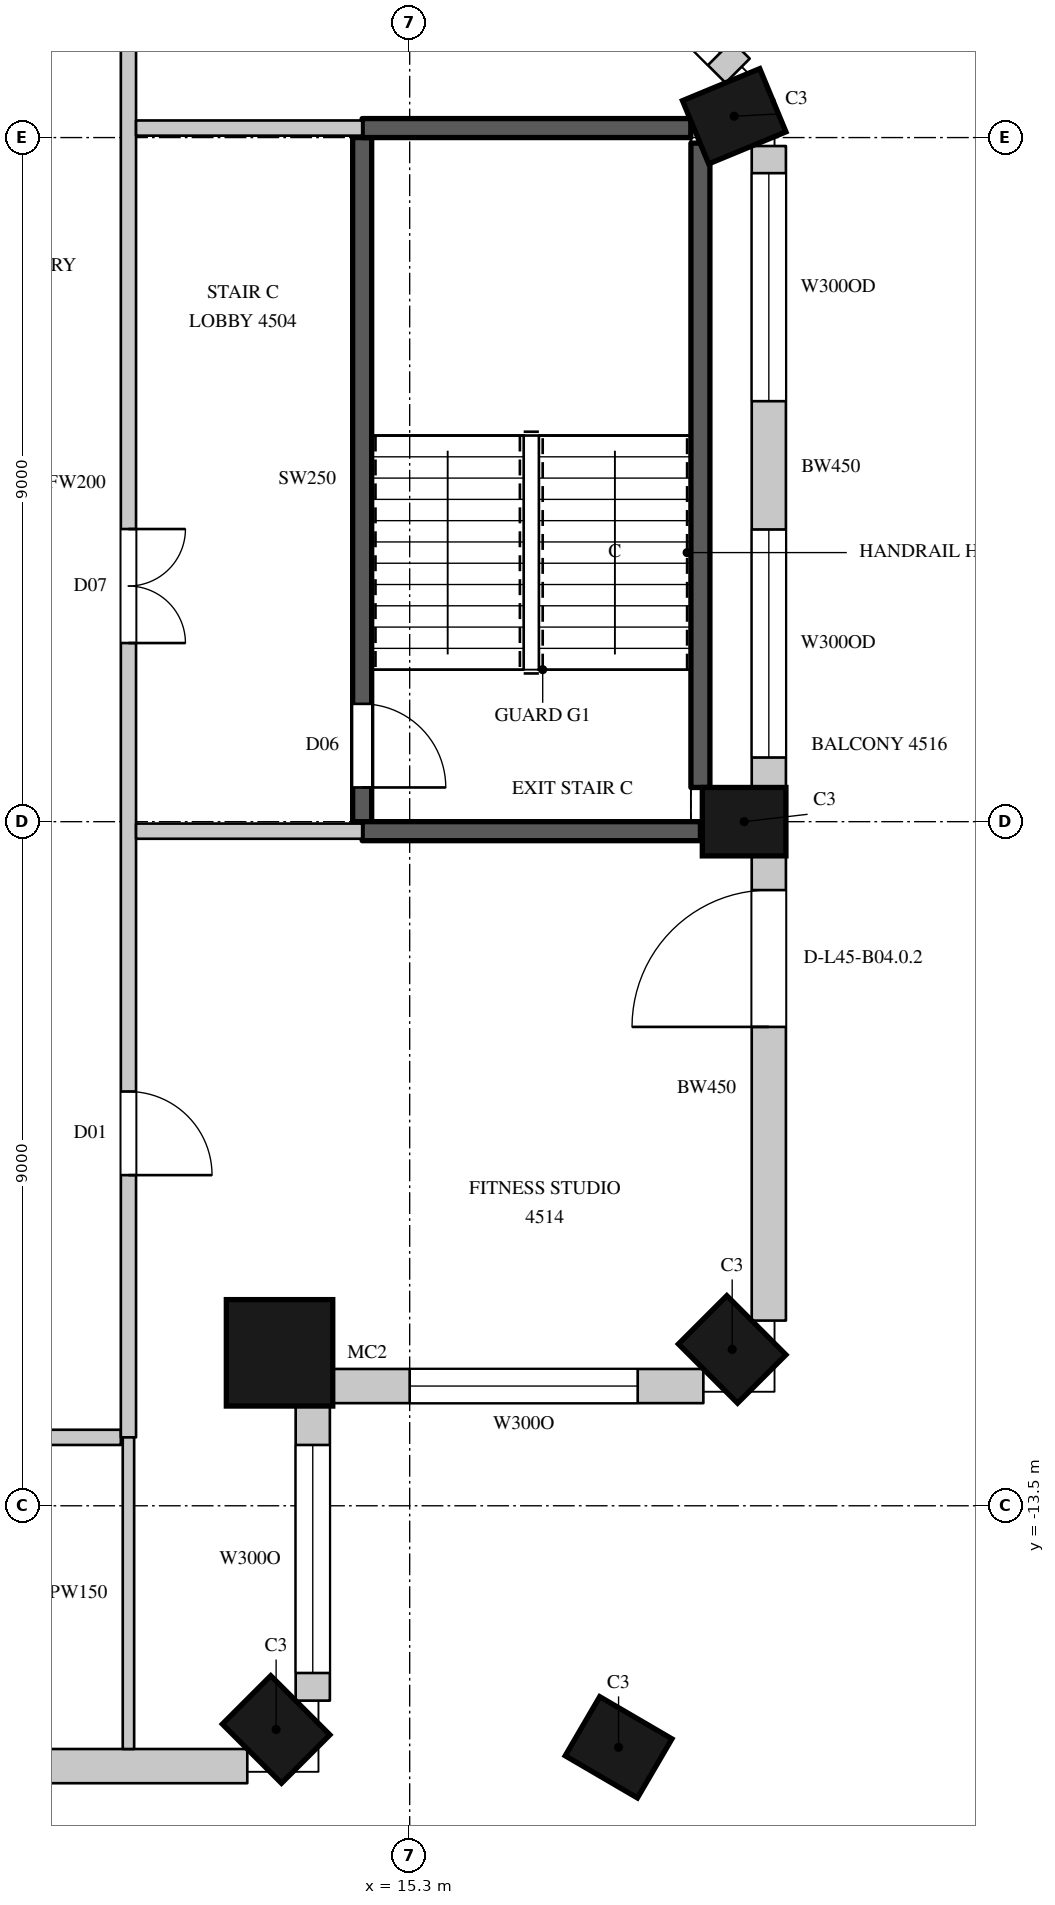
"""IFC4 building model, lengths in metres.
Left out: names, types, materials, properties, quantities, classifications, styles, units other than length and angle.
Written with IfcOpenShell. Run it as: python <this file> out.ifc"""

import sys

from ifc_helpers import new_model, si_unit, direction, frame, frame_2d, origin, origin_2d, place, context, subcontext, project, spatial, rectangle, circle, extrude, element, fill, save


model = new_model("IFC4")
c1 = context("Model", 3, precision=1e-05, world=origin(), true_north=direction((0.0, 1.0)))
c2 = subcontext(c1, "Body", "Model", "MODEL_VIEW")
j1 = project(units=[si_unit("LENGTHUNIT", "METRE"), si_unit("PLANEANGLEUNIT", "RADIAN")], contexts=[c1])
p1 = place(None, origin())
s1 = spatial("IfcSite", under=j1, at=p1, CompositionType="ELEMENT")
p2 = place(p1, origin())
s2 = spatial("IfcBuilding", under=s1, at=p2, CompositionType="ELEMENT")
p3 = place(p2, frame((0.0, 0.0, 205.6)))
s3 = spatial("IfcBuildingStorey", under=s2, at=p3, CompositionType="ELEMENT", Elevation=205.6)
p4 = place(p3, frame((13.543, -16.443, 0.0), z_axis=(0.0, 0.0, 1.0), x_axis=(0.707106781187, 0.707106781187, 0.0)))
e1 = element("IfcColumn", 1, at=p4, inside=s3, PredefinedType="COLUMN", context=c2, shape_type="SweptSolid", body=[
    extrude(rectangle(XDim=0.9, YDim=1.1, at=origin_2d()), origin(), (0.0, 0.0, 1.0), 4.1),
])
p5 = place(p3, frame((13.588, -11.488, 0.0), z_axis=(0.0, 0.0, 1.0), x_axis=(1.0, 0.0, 0.0)))
e2 = element("IfcColumn", 2, at=p5, inside=s3, PredefinedType="COLUMN", context=c2, shape_type="SweptSolid", body=[
    extrude(circle(Radius=0.7, at=origin_2d()), origin(), (0.0, 0.0, 1.0), 4.1),
])
for number, where, z_axis, x_axis in (
    (3, (19.543, -11.443, 0.0), (0.0, 0.0, 1.0), (0.707, 0.707, 0.0)),
    (4, (19.7, -4.5, 0.0), (0.0, 0.0, 1.0), (0.0, 1.0, 0.0)),
    (5, (19.57, 4.78, 0.0), (0.0, 0.0, 1.0), (-0.383, 0.924, 0.0)),
    (6, (18.048, -16.677, 0.0), (0.0, 0.0, 1.0), (0.504, 0.863, 0.0)),
):
    element("IfcColumn", number, at=place(p3, frame(where, z_axis=z_axis, x_axis=x_axis)), inside=s3, PredefinedType="COLUMN", context=c2, shape_type="SweptSolid", body=[
        extrude(rectangle(XDim=0.9, YDim=1.1, at=origin_2d()), origin(), (0.0, 0.0, 1.0), 4.1),
    ])
p6 = place(p3, frame((6.75, -16.925, 0.0), z_axis=(0.0, 0.0, 1.0), x_axis=(1.0, 0.0, 0.0)))
e7 = element("IfcWall", 7, at=p6, inside=s3, PredefinedType="SOLIDWALL", context=c2, shape_type="SweptSolid", body=[
    extrude(rectangle(XDim=6.414, YDim=0.45, at=frame_2d((3.207, 0.0))), origin(), (0.0, 0.0, 1.0), 3.8),
])
p7 = place(p6, frame((0.525, 0.0, 0.0)))
e8 = element("IfcOpeningElement", 8, at=p7, cuts=e7, PredefinedType="OPENING", context=c2, shape_type="SweptSolid", body=[
    extrude(rectangle(XDim=1.8, YDim=2.4, at=frame_2d((0.9, 1.2))), frame((0.0, 0.235, 0.0), z_axis=(0.0, -1.0, 0.0), x_axis=(1.0, 0.0, 0.0)), (0.0, 0.0, 1.0), 0.47),
])
p8 = place(p3, frame((14.025, -16.064, 0.0), z_axis=(0.0, 0.0, 1.0), x_axis=(0.0, 1.0, 0.0)))
e9 = element("IfcWall", 9, at=p8, inside=s3, PredefinedType="SOLIDWALL", context=c2, shape_type="SweptSolid", body=[
    extrude(rectangle(XDim=3.909, YDim=0.45, at=frame_2d((1.955, 0.0))), origin(), (0.0, 0.0, 1.0), 3.8),
])
p9 = place(p8, frame((0.364, 0.0, 1.05)))
e10 = element("IfcOpeningElement", 10, at=p9, cuts=e9, PredefinedType="OPENING", context=c2, shape_type="SweptSolid", body=[
    extrude(rectangle(XDim=3.0, YDim=2.4, at=frame_2d((1.5, 1.2))), frame((0.0, 0.235, 0.0), z_axis=(0.0, -1.0, 0.0), x_axis=(1.0, 0.0, 0.0)), (0.0, 0.0, 1.0), 0.47),
])
p10 = place(p3, frame((14.255, -11.925, 0.0), z_axis=(0.0, 0.0, 1.0), x_axis=(1.0, 0.0, 0.0)))
e11 = element("IfcWall", 11, at=p10, inside=s3, PredefinedType="SOLIDWALL", context=c2, shape_type="SweptSolid", body=[
    extrude(rectangle(XDim=4.909, YDim=0.45, at=frame_2d((2.455, 0.0))), origin(), (0.0, 0.0, 1.0), 3.8),
])
p11 = place(p10, frame((1.045, 0.0, 1.05)))
e12 = element("IfcOpeningElement", 12, at=p11, cuts=e11, PredefinedType="OPENING", context=c2, shape_type="SweptSolid", body=[
    extrude(rectangle(XDim=3.0, YDim=2.4, at=frame_2d((1.5, 1.2))), frame((0.0, 0.235, 0.0), z_axis=(0.0, -1.0, 0.0), x_axis=(1.0, 0.0, 0.0)), (0.0, 0.0, 1.0), 0.47),
])
p12 = place(p3, frame((20.025, -11.064, 0.0), z_axis=(0.0, 0.0, 1.0), x_axis=(0.0, 1.0, 0.0)))
e13 = element("IfcWall", 13, at=p12, inside=s3, PredefinedType="SOLIDWALL", context=c2, shape_type="SweptSolid", body=[
    extrude(rectangle(XDim=6.114, YDim=0.45, at=frame_2d((3.057, 0.0))), origin(), (0.0, 0.0, 1.0), 3.8),
])
p13 = place(p12, frame((3.864, 0.0, 0.0)))
e14 = element("IfcOpeningElement", 14, at=p13, cuts=e13, PredefinedType="OPENING", context=c2, shape_type="SweptSolid", body=[
    extrude(rectangle(XDim=1.8, YDim=2.4, at=frame_2d((0.9, 1.2))), frame((0.0, 0.235, 0.0), z_axis=(0.0, -1.0, 0.0), x_axis=(1.0, 0.0, 0.0)), (0.0, 0.0, 1.0), 0.47),
])
p14 = place(p3, frame((20.025, -4.05, 0.0), z_axis=(0.0, 0.0, 1.0), x_axis=(0.0, 1.0, 0.0)))
e15 = element("IfcWall", 15, at=p14, inside=s3, PredefinedType="SOLIDWALL", context=c2, shape_type="SweptSolid", body=[
    extrude(rectangle(XDim=8.439, YDim=0.45, at=frame_2d((4.219, 0.0))), origin(), (0.0, 0.0, 1.0), 3.8),
])
p15 = place(p14, frame((0.394, 0.0, 1.05)))
e16 = element("IfcOpeningElement", 16, at=p15, cuts=e15, PredefinedType="OPENING", context=c2, shape_type="SweptSolid", body=[
    extrude(rectangle(XDim=3.0, YDim=2.4, at=frame_2d((1.5, 1.2))), frame((0.0, 0.235, 0.0), z_axis=(0.0, -1.0, 0.0), x_axis=(1.0, 0.0, 0.0)), (0.0, 0.0, 1.0), 0.47),
])
p16 = place(p14, frame((5.082, 0.0, 1.05)))
e17 = element("IfcOpeningElement", 17, at=p16, cuts=e15, PredefinedType="OPENING", context=c2, shape_type="SweptSolid", body=[
    extrude(rectangle(XDim=3.0, YDim=2.4, at=frame_2d((1.5, 1.2))), frame((0.0, 0.235, 0.0), z_axis=(0.0, -1.0, 0.0), x_axis=(1.0, 0.0, 0.0)), (0.0, 0.0, 1.0), 0.47),
])
p17 = place(p3, frame((19.615, 5.379, 0.0), z_axis=(0.0, 0.0, 1.0), x_axis=(-0.707089646058, 0.7071239159, 0.0)))
e18 = element("IfcWall", 18, at=p17, inside=s3, PredefinedType="SOLIDWALL", context=c2, shape_type="SweptSolid", body=[
    extrude(rectangle(XDim=7.124, YDim=0.45, at=frame_2d((3.562, 0.0))), origin(), (0.0, 0.0, 1.0), 3.8),
])
p18 = place(p17, frame((0.328, 0.0, 1.05)))
e19 = element("IfcOpeningElement", 19, at=p18, cuts=e18, PredefinedType="OPENING", context=c2, shape_type="SweptSolid", body=[
    extrude(rectangle(XDim=2.4, YDim=2.4, at=frame_2d((1.2, 1.2))), frame((0.0, 0.235, 0.0), z_axis=(0.0, -1.0, 0.0), x_axis=(1.0, 0.0, 0.0)), (0.0, 0.0, 1.0), 0.47),
])
p19 = place(p17, frame((4.359, 0.0, 1.05)))
e20 = element("IfcOpeningElement", 20, at=p19, cuts=e18, PredefinedType="OPENING", context=c2, shape_type="SweptSolid", body=[
    extrude(rectangle(XDim=2.4, YDim=2.4, at=frame_2d((1.2, 1.2))), frame((0.0, 0.235, 0.0), z_axis=(0.0, -1.0, 0.0), x_axis=(1.0, 0.0, 0.0)), (0.0, 0.0, 1.0), 0.47),
])
p20 = place(p3, frame((6.28, -12.6, 0.0), z_axis=(0.0, 0.0, 1.0), x_axis=(1.0, 0.0, 0.0)))
e21 = element("IfcWall", 21, at=p20, inside=s3, PredefinedType="PARTITIONING", context=c2, shape_type="SweptSolid", body=[
    extrude(rectangle(XDim=5.22, YDim=0.2, at=frame_2d((2.61, 0.0))), origin(), (0.0, 0.0, 1.0), 3.8),
])
p21 = place(p20, frame((0.8, 0.0, 0.0)))
e22 = element("IfcOpeningElement", 22, at=p21, cuts=e21, PredefinedType="OPENING", context=c2, shape_type="SweptSolid", body=[
    extrude(rectangle(XDim=1.1, YDim=2.4, at=frame_2d((0.55, 1.2))), frame((0.0, 0.11, 0.0), z_axis=(0.0, -1.0, 0.0), x_axis=(1.0, 0.0, 0.0)), (0.0, 0.0, 1.0), 0.22),
])
p22 = place(p3, frame((11.6, -12.6, 0.0), z_axis=(0.0, 0.0, 1.0), x_axis=(0.0, 1.0, 0.0)))
e23 = element("IfcWall", 23, at=p22, inside=s3, PredefinedType="PARTITIONING", context=c2, shape_type="SweptSolid", body=[
    extrude(rectangle(XDim=25.1, YDim=0.2, at=frame_2d((12.55, 0.0))), origin(), (0.0, 0.0, 1.0), 3.8),
])
p23 = place(p22, frame((10.45, 0.0, 0.0)))
e24 = element("IfcOpeningElement", 24, at=p23, cuts=e23, PredefinedType="OPENING", context=c2, shape_type="SweptSolid", body=[
    extrude(rectangle(XDim=1.5, YDim=2.4, at=frame_2d((0.75, 1.2))), frame((0.0, 0.11, 0.0), z_axis=(0.0, -1.0, 0.0), x_axis=(1.0, 0.0, 0.0)), (0.0, 0.0, 1.0), 0.22),
])
p24 = place(p22, frame((3.45, 0.0, 0.0)))
e25 = element("IfcOpeningElement", 25, at=p24, cuts=e23, PredefinedType="OPENING", context=c2, shape_type="SweptSolid", body=[
    extrude(rectangle(XDim=1.1, YDim=2.4, at=frame_2d((0.55, 1.2))), frame((0.0, 0.11, 0.0), z_axis=(0.0, -1.0, 0.0), x_axis=(1.0, 0.0, 0.0)), (0.0, 0.0, 1.0), 0.22),
])
for number, where, z_axis, x_axis in (
    (26, (11.7, -4.625, 0.0), (0.0, 0.0, 1.0), (1.0, 0.0, 0.0)),
    (27, (11.7, 4.625, 0.0), (0.0, 0.0, 1.0), (1.0, 0.0, 0.0)),
):
    element("IfcWall", number, at=place(p3, frame(where, z_axis=z_axis, x_axis=x_axis)), inside=s3, PredefinedType="PARTITIONING", context=c2, shape_type="SweptSolid", body=[
        extrude(rectangle(XDim=2.975, YDim=0.2, at=frame_2d((1.488, 0.0))), origin(), (0.0, 0.0, 1.0), 3.8),
    ])
p25 = place(p3, frame((11.6, -16.7, 0.0), z_axis=(0.0, 0.0, 1.0), x_axis=(0.0, 1.0, 0.0)))
e28 = element("IfcWall", 28, at=p25, inside=s3, PredefinedType="PARTITIONING", context=c2, shape_type="SweptSolid", body=[
    extrude(rectangle(XDim=4.1, YDim=0.15, at=frame_2d((2.05, 0.0))), origin(), (0.0, 0.0, 1.0), 3.8),
])
p26 = place(p3, frame((14.675, -4.5, 0.0), z_axis=(0.0, 0.0, 1.0), x_axis=(0.0, 1.0, 0.0)))
e29 = element("IfcWall", 29, at=p26, inside=s3, PredefinedType="SHEAR", context=c2, shape_type="SweptSolid", body=[
    extrude(rectangle(XDim=9.0, YDim=0.25, at=frame_2d((4.5, 0.0))), origin(), (0.0, 0.0, 1.0), 3.8),
])
p27 = place(p26, frame((0.45, 0.0, 0.0)))
e30 = element("IfcOpeningElement", 30, at=p27, cuts=e29, PredefinedType="OPENING", context=c2, shape_type="SweptSolid", body=[
    extrude(rectangle(XDim=1.1, YDim=2.2, at=frame_2d((0.55, 1.1))), frame((0.0, 0.135, 0.0), z_axis=(0.0, -1.0, 0.0), x_axis=(1.0, 0.0, 0.0)), (0.0, 0.0, 1.0), 0.27),
])
p28 = place(p3, frame((14.675, -4.625, 0.0), z_axis=(0.0, 0.0, 1.0), x_axis=(1.0, 0.0, 0.0)))
e31 = element("IfcWall", 31, at=p28, inside=s3, PredefinedType="SHEAR", context=c2, shape_type="SweptSolid", body=[
    extrude(rectangle(XDim=4.45, YDim=0.25, at=frame_2d((2.225, 0.0))), origin(), (0.0, 0.0, 1.0), 3.8),
])
p29 = place(p3, frame((14.675, 4.625, 0.0), z_axis=(0.0, 0.0, 1.0), x_axis=(1.0, 0.0, 0.0)))
e32 = element("IfcWall", 32, at=p29, inside=s3, PredefinedType="SHEAR", context=c2, shape_type="SweptSolid", body=[
    extrude(rectangle(XDim=4.324, YDim=0.25, at=frame_2d((2.162, 0.0))), origin(), (0.0, 0.0, 1.0), 3.8),
])
p30 = place(p3, frame((19.125, -4.05, 0.0), z_axis=(0.0, 0.0, 1.0), x_axis=(0.0, 1.0, 0.0)))
e33 = element("IfcWall", 33, at=p30, inside=s3, PredefinedType="SHEAR", context=c2, shape_type="SweptSolid", body=[
    extrude(rectangle(XDim=8.477, YDim=0.25, at=frame_2d((4.238, 0.0))), origin(), (0.0, 0.0, 1.0), 3.8),
])
p31 = place(p9, origin())
e34 = element("IfcWindow", 34, at=p31, inside=s3, PartitioningType="SINGLE_PANEL", PredefinedType="WINDOW", context=c2, shape_type="SweptSolid", body=[
    extrude(rectangle(XDim=3.0, YDim=2.4, at=frame_2d((1.5, 1.2))), frame((0.0, 0.135, 0.0), z_axis=(0.0, -1.0, 0.0), x_axis=(1.0, 0.0, 0.0)), (0.0, 0.0, 1.0), 0.06),
])
fill(e10, e34)
p32 = place(p11, origin())
e35 = element("IfcWindow", 35, at=p32, inside=s3, PartitioningType="SINGLE_PANEL", PredefinedType="WINDOW", context=c2, shape_type="SweptSolid", body=[
    extrude(rectangle(XDim=3.0, YDim=2.4, at=frame_2d((1.5, 1.2))), frame((0.0, 0.135, 0.0), z_axis=(0.0, -1.0, 0.0), x_axis=(1.0, 0.0, 0.0)), (0.0, 0.0, 1.0), 0.06),
])
fill(e12, e35)
p33 = place(p13, origin())
e36 = element("IfcDoor", 36, at=p33, inside=s3, OperationType="SLIDING_TO_LEFT", PredefinedType="DOOR", context=c2, shape_type="SweptSolid", body=[
    extrude(rectangle(XDim=1.8, YDim=2.4, at=frame_2d((0.9, 1.2))), frame((0.0, 0.13, 0.0), z_axis=(0.0, -1.0, 0.0), x_axis=(1.0, 0.0, 0.0)), (0.0, 0.0, 1.0), 0.05),
])
fill(e14, e36)
p34 = place(p15, origin())
e37 = element("IfcWindow", 37, at=p34, inside=s3, PartitioningType="SINGLE_PANEL", PredefinedType="WINDOW", context=c2, shape_type="SweptSolid", body=[
    extrude(rectangle(XDim=3.0, YDim=2.4, at=frame_2d((1.5, 1.2))), frame((0.0, 0.135, 0.0), z_axis=(0.0, -1.0, 0.0), x_axis=(1.0, 0.0, 0.0)), (0.0, 0.0, 1.0), 0.06),
])
fill(e16, e37)
p35 = place(p16, origin())
e38 = element("IfcWindow", 38, at=p35, inside=s3, PartitioningType="SINGLE_PANEL", PredefinedType="WINDOW", context=c2, shape_type="SweptSolid", body=[
    extrude(rectangle(XDim=3.0, YDim=2.4, at=frame_2d((1.5, 1.2))), frame((0.0, 0.135, 0.0), z_axis=(0.0, -1.0, 0.0), x_axis=(1.0, 0.0, 0.0)), (0.0, 0.0, 1.0), 0.06),
])
fill(e17, e38)
p36 = place(p18, origin())
e39 = element("IfcWindow", 39, at=p36, inside=s3, PartitioningType="SINGLE_PANEL", PredefinedType="WINDOW", context=c2, shape_type="SweptSolid", body=[
    extrude(rectangle(XDim=2.4, YDim=2.4, at=frame_2d((1.2, 1.2))), frame((0.0, 0.135, 0.0), z_axis=(0.0, -1.0, 0.0), x_axis=(1.0, 0.0, 0.0)), (0.0, 0.0, 1.0), 0.06),
])
fill(e19, e39)
p37 = place(p23, origin())
e40 = element("IfcDoor", 40, at=p37, inside=s3, OperationType="DOUBLE_DOOR_SINGLE_SWING", PredefinedType="DOOR", context=c2, shape_type="SweptSolid", body=[
    extrude(rectangle(XDim=1.5, YDim=2.4, at=frame_2d((0.75, 1.2))), frame((0.0, 0.025, 0.0), z_axis=(0.0, -1.0, 0.0), x_axis=(1.0, 0.0, 0.0)), (0.0, 0.0, 1.0), 0.05),
])
fill(e24, e40)
p38 = place(p24, origin())
e41 = element("IfcDoor", 41, at=p38, inside=s3, OperationType="SINGLE_SWING_RIGHT", PredefinedType="DOOR", context=c2, shape_type="SweptSolid", body=[
    extrude(rectangle(XDim=1.1, YDim=2.4, at=frame_2d((0.55, 1.2))), frame((0.0, 0.025, 0.0), z_axis=(0.0, -1.0, 0.0), x_axis=(1.0, 0.0, 0.0)), (0.0, 0.0, 1.0), 0.05),
])
fill(e25, e41)
p39 = place(p27, origin())
e42 = element("IfcDoor", 42, at=p39, inside=s3, OperationType="SINGLE_SWING_RIGHT", PredefinedType="DOOR", context=c2, shape_type="SweptSolid", body=[
    extrude(rectangle(XDim=1.1, YDim=2.2, at=frame_2d((0.55, 1.1))), frame((0.0, 0.025, 0.0), z_axis=(0.0, -1.0, 0.0), x_axis=(1.0, 0.0, 0.0)), (0.0, 0.0, 1.0), 0.05),
])
fill(e30, e42)
save(model, sys.argv[1])
